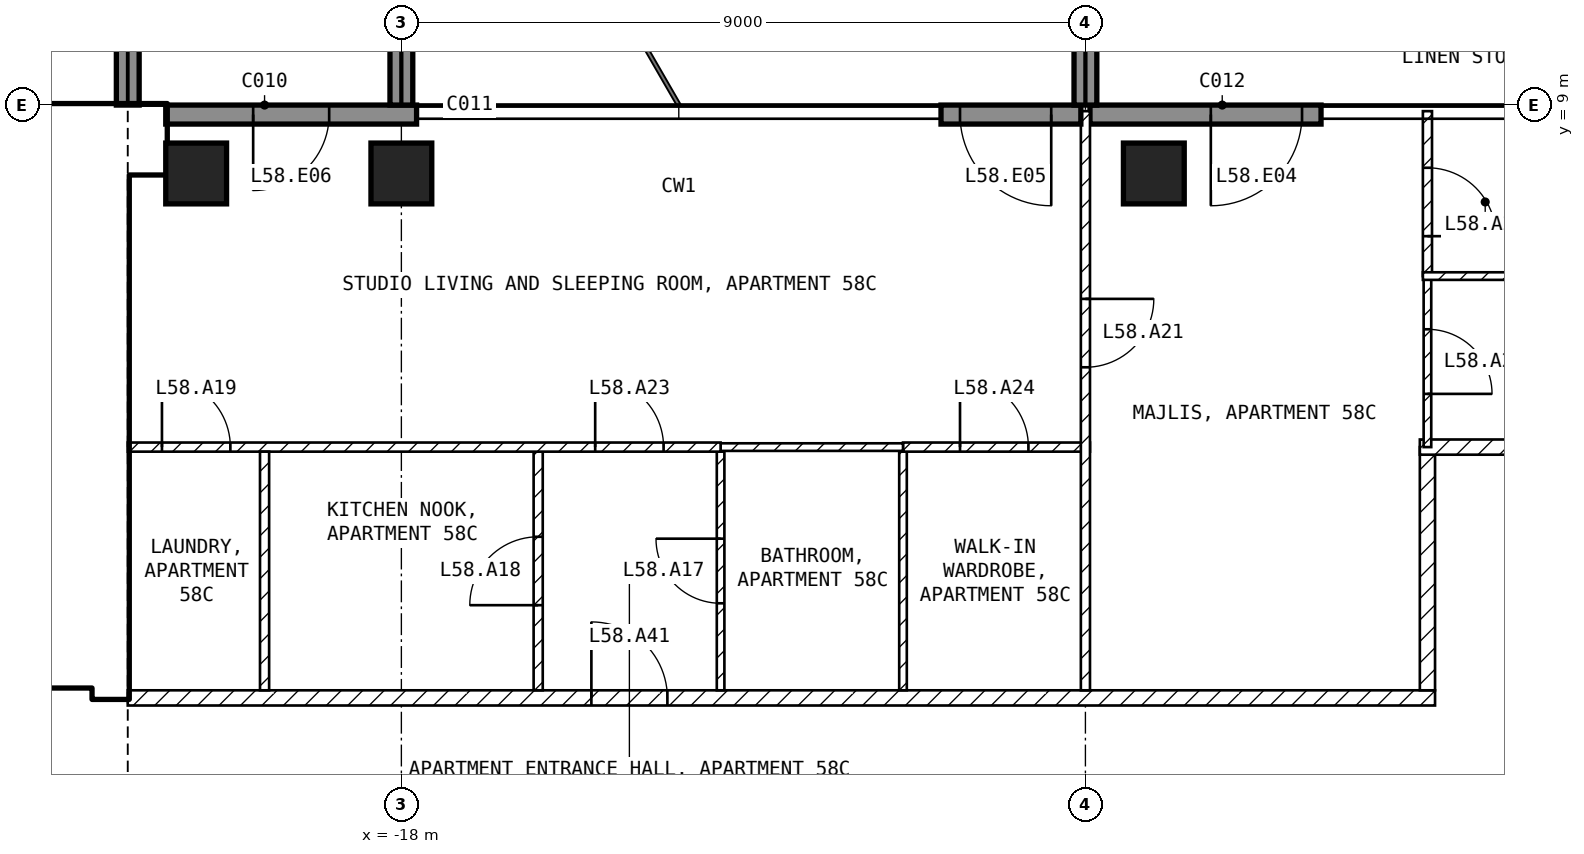
"""IFC4 building model, lengths in metres.
Left out: names, types, materials, properties, quantities, classifications, styles, units other than length and angle.
Written with IfcOpenShell. Run it as: python <this file> out.ifc"""

import sys

from ifc_helpers import new_model, si_unit, direction, frame, frame_2d, origin, origin_2d, place, context, subcontext, project, spatial, rectangle, extrude, element, fill, save


model = new_model("IFC4")
c1 = context("Model", 3, precision=1e-05, world=origin(), true_north=direction((0.0, 1.0)))
c2 = subcontext(c1, "Body", "Model", "MODEL_VIEW")
j1 = project(units=[si_unit("LENGTHUNIT", "METRE"), si_unit("PLANEANGLEUNIT", "RADIAN")], contexts=[c1])
p1 = place(None, origin())
s1 = spatial("IfcSite", under=j1, at=p1, CompositionType="ELEMENT")
p2 = place(p1, origin())
s2 = spatial("IfcBuilding", under=s1, at=p2, CompositionType="ELEMENT")
p3 = place(p2, frame((0.0, 0.0, 232.5)))
s3 = spatial("IfcBuildingStorey", under=s2, at=p3, CompositionType="ELEMENT", Elevation=232.5)
for number, where, z_axis, x_axis in (
    (1, (-20.7, 8.1, -0.25), (0.0, 0.0, 1.0), (1.0, 0.0, 0.0)),
    (2, (-18.0, 8.1, -0.25), (0.0, 0.0, 1.0), (1.0, 0.0, 0.0)),
    (3, (-8.1, 8.1, -0.25), (0.0, 0.0, 1.0), (1.0, 0.0, 0.0)),
):
    element("IfcColumn", number, at=place(p3, frame(where, z_axis=z_axis, x_axis=x_axis)), inside=s3, PredefinedType="COLUMN", context=c2, shape_type="SweptSolid", body=[
        extrude(rectangle(XDim=0.8, YDim=0.8, at=origin_2d()), origin(), (0.0, 0.0, 1.0), 3.5),
    ])
p4 = place(p3, frame((-5.9, 8.875, 0.0), z_axis=(0.0, 0.0, 1.0), x_axis=(-1.0, 0.0, 0.0)))
e4 = element("IfcWall", 4, at=p4, inside=s3, PredefinedType="SOLIDWALL", context=c2, shape_type="SweptSolid", body=[
    extrude(rectangle(XDim=3.04, YDim=0.25, at=frame_2d((1.52, 0.0))), origin(), (0.0, 0.0, 1.0), 3.25),
])
p5 = place(p4, frame((0.25, 0.0, 0.0)))
e5 = element("IfcOpeningElement", 5, at=p5, cuts=e4, PredefinedType="OPENING", context=c2, shape_type="SweptSolid", body=[
    extrude(rectangle(XDim=1.2, YDim=2.4, at=frame_2d((0.6, 1.2))), frame((0.0, 0.135, 0.0), z_axis=(0.0, -1.0, 0.0), x_axis=(1.0, 0.0, 0.0)), (0.0, 0.0, 1.0), 0.27),
])
p6 = place(p3, frame((-9.06, 8.875, 0.0), z_axis=(0.0, 0.0, 1.0), x_axis=(-1.0, 0.0, 0.0)))
e6 = element("IfcWall", 6, at=p6, inside=s3, PredefinedType="SOLIDWALL", context=c2, shape_type="SweptSolid", body=[
    extrude(rectangle(XDim=1.84, YDim=0.25, at=frame_2d((0.92, 0.0))), origin(), (0.0, 0.0, 1.0), 3.25),
])
p7 = place(p6, frame((0.39, 0.0, 0.0)))
e7 = element("IfcOpeningElement", 7, at=p7, cuts=e6, PredefinedType="OPENING", context=c2, shape_type="SweptSolid", body=[
    extrude(rectangle(XDim=1.2, YDim=2.4, at=frame_2d((0.6, 1.2))), frame((0.0, 0.135, 0.0), z_axis=(0.0, -1.0, 0.0), x_axis=(1.0, 0.0, 0.0)), (0.0, 0.0, 1.0), 0.27),
])
p8 = place(p3, frame((-17.8, 8.875, 0.0), z_axis=(0.0, 0.0, 1.0), x_axis=(-1.0, 0.0, 0.0)))
e8 = element("IfcWall", 8, at=p8, inside=s3, PredefinedType="SOLIDWALL", context=c2, shape_type="SweptSolid", body=[
    extrude(rectangle(XDim=3.3, YDim=0.25, at=frame_2d((1.65, 0.0))), origin(), (0.0, 0.0, 1.0), 3.25),
])
p9 = place(p8, frame((1.15, 0.0, 0.0)))
e9 = element("IfcOpeningElement", 9, at=p9, cuts=e8, PredefinedType="OPENING", context=c2, shape_type="SweptSolid", body=[
    extrude(rectangle(XDim=1.0, YDim=2.4, at=frame_2d((0.5, 1.2))), frame((0.0, 0.135, 0.0), z_axis=(0.0, -1.0, 0.0), x_axis=(1.0, 0.0, 0.0)), (0.0, 0.0, 1.0), 0.27),
])
for number, where, z_axis, x_axis in (
    (10, (-21.6, 9.0, 0.0), (0.0, 0.0, 1.0), (0.0, 1.0, 0.0)),
    (11, (-18.0, 9.0, 0.0), (0.0, 0.0, 1.0), (0.0, 1.0, 0.0)),
    (12, (-9.0, 9.0, 0.0), (0.0, 0.0, 1.0), (0.0, 1.0, 0.0)),
):
    element("IfcWall", number, at=place(p3, frame(where, z_axis=z_axis, x_axis=x_axis)), inside=s3, PredefinedType="SOLIDWALL", context=c2, shape_type="SweptSolid", body=[
        extrude(rectangle(XDim=2.7, YDim=0.3, at=frame_2d((1.35, 0.0))), origin(), (0.0, 0.0, 1.0), 3.25),
    ])
p10 = place(p3, frame((-29.75, 8.55, 0.0), z_axis=(0.0, 0.0, 1.0), x_axis=(1.0, 0.0, 0.0)))
e13 = element("IfcWall", 13, at=p10, inside=s3, PredefinedType="SHEAR", context=c2, shape_type="SweptSolid", body=[
    extrude(rectangle(XDim=8.65, YDim=0.9, at=frame_2d((4.325, 0.0))), origin(), (0.0, 0.0, 1.0), 3.25),
])
p11 = place(p3, frame((-21.825, 1.2, 0.0), z_axis=(0.0, 0.0, 1.0), x_axis=(0.0, 1.0, 0.0)))
e14 = element("IfcWall", 14, at=p11, inside=s3, PredefinedType="SHEAR", context=c2, shape_type="SweptSolid", body=[
    extrude(rectangle(XDim=6.9, YDim=0.45, at=frame_2d((3.45, 0.0))), origin(), (0.0, 0.0, 1.0), 3.25),
])
p12 = place(p3, frame((-33.35, 1.45, 0.0), z_axis=(0.0, 0.0, 1.0), x_axis=(1.0, 0.0, 0.0)))
e15 = element("IfcWall", 15, at=p12, inside=s3, PredefinedType="SOLIDWALL", context=c2, shape_type="SweptSolid", body=[
    extrude(rectangle(XDim=11.3, YDim=0.2, at=frame_2d((5.65, 0.0))), origin(), (0.0, 0.0, 1.0), 3.25),
])
p13 = place(p12, frame((9.55, 0.0, 0.0)))
e16 = element("IfcOpeningElement", 16, at=p13, cuts=e15, PredefinedType="OPENING", context=c2, shape_type="SweptSolid", body=[
    extrude(rectangle(XDim=1.0, YDim=2.1, at=frame_2d((0.5, 1.05))), frame((0.0, 0.11, 0.0), z_axis=(0.0, -1.0, 0.0), x_axis=(1.0, 0.0, 0.0)), (0.0, 0.0, 1.0), 0.22),
])
p14 = place(p12, frame((7.05, 0.0, 0.0)))
e17 = element("IfcOpeningElement", 17, at=p14, cuts=e15, PredefinedType="OPENING", context=c2, shape_type="SweptSolid", body=[
    extrude(rectangle(XDim=1.0, YDim=2.1, at=frame_2d((0.5, 1.05))), frame((0.0, 0.11, 0.0), z_axis=(0.0, -1.0, 0.0), x_axis=(1.0, 0.0, 0.0)), (0.0, 0.0, 1.0), 0.22),
])
p15 = place(p12, frame((1.175, 0.0, 0.0)))
e18 = element("IfcOpeningElement", 18, at=p15, cuts=e15, PredefinedType="OPENING", context=c2, shape_type="SweptSolid", body=[
    extrude(rectangle(XDim=0.9, YDim=2.1, at=frame_2d((0.45, 1.05))), frame((0.0, 0.11, 0.0), z_axis=(0.0, -1.0, 0.0), x_axis=(1.0, 0.0, 0.0)), (0.0, 0.0, 1.0), 0.22),
])
p16 = place(p3, frame((-28.35, 5.15, 0.0), z_axis=(0.0, 0.0, 1.0), x_axis=(1.0, 0.0, 0.0)))
e19 = element("IfcWall", 19, at=p16, inside=s3, PredefinedType="SOLIDWALL", context=c2, shape_type="SweptSolid", body=[
    extrude(rectangle(XDim=6.3, YDim=0.2, at=frame_2d((3.15, 0.0))), origin(), (0.0, 0.0, 1.0), 3.25),
])
p17 = place(p16, frame((5.1, 0.0, 0.0)))
e20 = element("IfcOpeningElement", 20, at=p17, cuts=e19, PredefinedType="OPENING", context=c2, shape_type="SweptSolid", body=[
    extrude(rectangle(XDim=1.0, YDim=2.1, at=frame_2d((0.5, 1.05))), frame((0.0, 0.11, 0.0), z_axis=(0.0, -1.0, 0.0), x_axis=(1.0, 0.0, 0.0)), (0.0, 0.0, 1.0), 0.22),
])
p18 = place(p3, frame((-21.6, 1.2, 0.0), z_axis=(0.0, 0.0, 1.0), x_axis=(1.0, 0.0, 0.0)))
e21 = element("IfcWall", 21, at=p18, inside=s3, PredefinedType="PARTITIONING", context=c2, shape_type="SweptSolid", body=[
    extrude(rectangle(XDim=17.2, YDim=0.2, at=frame_2d((8.6, 0.0))), origin(), (0.0, 0.0, 1.0), 3.25),
])
p19 = place(p18, frame((6.1, 0.0, 0.0)))
e22 = element("IfcOpeningElement", 22, at=p19, cuts=e21, PredefinedType="OPENING", context=c2, shape_type="SweptSolid", body=[
    extrude(rectangle(XDim=1.0, YDim=2.1, at=frame_2d((0.5, 1.05))), frame((0.0, 0.11, 0.0), z_axis=(0.0, -1.0, 0.0), x_axis=(1.0, 0.0, 0.0)), (0.0, 0.0, 1.0), 0.22),
])
p20 = place(p3, frame((-4.5, 1.3, 0.0), z_axis=(0.0, 0.0, 1.0), x_axis=(0.0, 1.0, 0.0)))
e23 = element("IfcWall", 23, at=p20, inside=s3, PredefinedType="PARTITIONING", context=c2, shape_type="SweptSolid", body=[
    extrude(rectangle(XDim=3.2, YDim=0.2, at=frame_2d((1.6, 0.0))), origin(), (0.0, 0.0, 1.0), 3.25),
])
p21 = place(p3, frame((-4.6, 4.5, 0.0), z_axis=(0.0, 0.0, 1.0), x_axis=(1.0, 0.0, 0.0)))
e24 = element("IfcWall", 24, at=p21, inside=s3, PredefinedType="PARTITIONING", context=c2, shape_type="SweptSolid", body=[
    extrude(rectangle(XDim=3.5, YDim=0.2, at=frame_2d((1.75, 0.0))), origin(), (0.0, 0.0, 1.0), 3.25),
])
p22 = place(p3, frame((-11.4, 1.3, 0.0), z_axis=(0.0, 0.0, 1.0), x_axis=(0.0, 1.0, 0.0)))
e25 = element("IfcWall", 25, at=p22, inside=s3, PredefinedType="PARTITIONING", context=c2, shape_type="SweptSolid", body=[
    extrude(rectangle(XDim=3.14, YDim=0.1, at=frame_2d((1.57, 0.0))), origin(), (0.0, 0.0, 1.0), 3.25),
])
p23 = place(p3, frame((-11.4, 4.5, 0.0), z_axis=(0.0, 0.0, 1.0), x_axis=(1.0, 0.0, 0.0)))
e26 = element("IfcWall", 26, at=p23, inside=s3, PredefinedType="PARTITIONING", context=c2, shape_type="SweptSolid", body=[
    extrude(rectangle(XDim=2.46, YDim=0.12, at=frame_2d((1.23, 0.0))), origin(), (0.0, 0.0, 1.0), 3.25),
])
p24 = place(p23, frame((0.75, 0.0, 0.0)))
e27 = element("IfcOpeningElement", 27, at=p24, cuts=e26, PredefinedType="OPENING", context=c2, shape_type="SweptSolid", body=[
    extrude(rectangle(XDim=0.9, YDim=2.1, at=frame_2d((0.45, 1.05))), frame((0.0, 0.07, 0.0), z_axis=(0.0, -1.0, 0.0), x_axis=(1.0, 0.0, 0.0)), (0.0, 0.0, 1.0), 0.14),
])
p25 = place(p3, frame((-9.0, 8.92, 0.0), z_axis=(0.0, 0.0, 1.0), x_axis=(0.0, -1.0, 0.0)))
e28 = element("IfcWall", 28, at=p25, inside=s3, PredefinedType="PARTITIONING", context=c2, shape_type="SweptSolid", body=[
    extrude(rectangle(XDim=7.62, YDim=0.12, at=frame_2d((3.81, 0.0))), origin(), (0.0, 0.0, 1.0), 3.25),
])
p26 = place(p25, frame((2.47, 0.0, 0.0)))
e29 = element("IfcOpeningElement", 29, at=p26, cuts=e28, PredefinedType="OPENING", context=c2, shape_type="SweptSolid", body=[
    extrude(rectangle(XDim=0.9, YDim=2.1, at=frame_2d((0.45, 1.05))), frame((0.0, 0.07, 0.0), z_axis=(0.0, -1.0, 0.0), x_axis=(1.0, 0.0, 0.0)), (0.0, 0.0, 1.0), 0.14),
])
p27 = place(p3, frame((-13.8, 1.3, 0.0), z_axis=(0.0, 0.0, 1.0), x_axis=(0.0, 1.0, 0.0)))
e30 = element("IfcWall", 30, at=p27, inside=s3, PredefinedType="PARTITIONING", context=c2, shape_type="SweptSolid", body=[
    extrude(rectangle(XDim=3.14, YDim=0.1, at=frame_2d((1.57, 0.0))), origin(), (0.0, 0.0, 1.0), 3.25),
])
p28 = place(p27, frame((1.145, 0.0, 0.0)))
e31 = element("IfcOpeningElement", 31, at=p28, cuts=e30, PredefinedType="OPENING", context=c2, shape_type="SweptSolid", body=[
    extrude(rectangle(XDim=0.85, YDim=2.1, at=frame_2d((0.425, 1.05))), frame((0.0, 0.06, 0.0), z_axis=(0.0, -1.0, 0.0), x_axis=(1.0, 0.0, 0.0)), (0.0, 0.0, 1.0), 0.12),
])
p29 = place(p3, frame((-13.8, 4.5, 0.0), z_axis=(0.0, 0.0, 1.0), x_axis=(1.0, 0.0, 0.0)))
e32 = element("IfcWall", 32, at=p29, inside=s3, PredefinedType="PARTITIONING", context=c2, shape_type="SweptSolid", body=[
    extrude(rectangle(XDim=2.4, YDim=0.1, at=frame_2d((1.2, 0.0))), origin(), (0.0, 0.0, 1.0), 3.25),
])
p30 = place(p3, frame((-16.2, 1.3, 0.0), z_axis=(0.0, 0.0, 1.0), x_axis=(0.0, 1.0, 0.0)))
e33 = element("IfcWall", 33, at=p30, inside=s3, PredefinedType="PARTITIONING", context=c2, shape_type="SweptSolid", body=[
    extrude(rectangle(XDim=3.14, YDim=0.12, at=frame_2d((1.57, 0.0))), origin(), (0.0, 0.0, 1.0), 3.25),
])
p31 = place(p30, frame((1.12, 0.0, 0.0)))
e34 = element("IfcOpeningElement", 34, at=p31, cuts=e33, PredefinedType="OPENING", context=c2, shape_type="SweptSolid", body=[
    extrude(rectangle(XDim=0.9, YDim=2.1, at=frame_2d((0.45, 1.05))), frame((0.0, 0.07, 0.0), z_axis=(0.0, -1.0, 0.0), x_axis=(1.0, 0.0, 0.0)), (0.0, 0.0, 1.0), 0.14),
])
p32 = place(p3, frame((-21.6, 4.5, 0.0), z_axis=(0.0, 0.0, 1.0), x_axis=(1.0, 0.0, 0.0)))
e35 = element("IfcWall", 35, at=p32, inside=s3, PredefinedType="PARTITIONING", context=c2, shape_type="SweptSolid", body=[
    extrude(rectangle(XDim=7.8, YDim=0.12, at=frame_2d((3.9, 0.0))), origin(), (0.0, 0.0, 1.0), 3.25),
])
p33 = place(p32, frame((0.45, 0.0, 0.0)))
e36 = element("IfcOpeningElement", 36, at=p33, cuts=e35, PredefinedType="OPENING", context=c2, shape_type="SweptSolid", body=[
    extrude(rectangle(XDim=0.9, YDim=2.1, at=frame_2d((0.45, 1.05))), frame((0.0, 0.07, 0.0), z_axis=(0.0, -1.0, 0.0), x_axis=(1.0, 0.0, 0.0)), (0.0, 0.0, 1.0), 0.14),
])
p34 = place(p32, frame((6.15, 0.0, 0.0)))
e37 = element("IfcOpeningElement", 37, at=p34, cuts=e35, PredefinedType="OPENING", context=c2, shape_type="SweptSolid", body=[
    extrude(rectangle(XDim=0.9, YDim=2.1, at=frame_2d((0.45, 1.05))), frame((0.0, 0.07, 0.0), z_axis=(0.0, -1.0, 0.0), x_axis=(1.0, 0.0, 0.0)), (0.0, 0.0, 1.0), 0.14),
])
p35 = place(p3, frame((-19.8, 1.3, 0.0), z_axis=(0.0, 0.0, 1.0), x_axis=(0.0, 1.0, 0.0)))
e38 = element("IfcWall", 38, at=p35, inside=s3, PredefinedType="PARTITIONING", context=c2, shape_type="SweptSolid", body=[
    extrude(rectangle(XDim=3.14, YDim=0.12, at=frame_2d((1.57, 0.0))), origin(), (0.0, 0.0, 1.0), 3.25),
])
p36 = place(p3, frame((-4.5, 6.75, 0.0), z_axis=(0.0, 0.0, 1.0), x_axis=(0.0, -1.0, 0.0)))
e39 = element("IfcWall", 39, at=p36, inside=s3, PredefinedType="PARTITIONING", context=c2, shape_type="SweptSolid", body=[
    extrude(rectangle(XDim=2.25, YDim=0.1, at=frame_2d((1.125, 0.0))), origin(), (0.0, 0.0, 1.0), 3.25),
])
p37 = place(p36, frame((0.7, 0.0, 0.0)))
e40 = element("IfcOpeningElement", 40, at=p37, cuts=e39, PredefinedType="OPENING", context=c2, shape_type="SweptSolid", body=[
    extrude(rectangle(XDim=0.85, YDim=2.1, at=frame_2d((0.425, 1.05))), frame((0.0, 0.06, 0.0), z_axis=(0.0, -1.0, 0.0), x_axis=(1.0, 0.0, 0.0)), (0.0, 0.0, 1.0), 0.12),
])
p38 = place(p3, frame((-4.5, 8.92, 0.0), z_axis=(0.0, 0.0, 1.0), x_axis=(0.0, -1.0, 0.0)))
e41 = element("IfcWall", 41, at=p38, inside=s3, PredefinedType="PARTITIONING", context=c2, shape_type="SweptSolid", body=[
    extrude(rectangle(XDim=2.17, YDim=0.12, at=frame_2d((1.085, 0.0))), origin(), (0.0, 0.0, 1.0), 3.25),
])
p39 = place(p38, frame((0.745, 0.0, 0.0)))
e42 = element("IfcOpeningElement", 42, at=p39, cuts=e41, PredefinedType="OPENING", context=c2, shape_type="SweptSolid", body=[
    extrude(rectangle(XDim=0.9, YDim=2.1, at=frame_2d((0.45, 1.05))), frame((0.0, 0.07, 0.0), z_axis=(0.0, -1.0, 0.0), x_axis=(1.0, 0.0, 0.0)), (0.0, 0.0, 1.0), 0.14),
])
p40 = place(p3, frame((-4.56, 6.75, 0.0), z_axis=(0.0, 0.0, 1.0), x_axis=(1.0, 0.0, 0.0)))
e43 = element("IfcWall", 43, at=p40, inside=s3, PredefinedType="PARTITIONING", context=c2, shape_type="SweptSolid", body=[
    extrude(rectangle(XDim=3.46, YDim=0.1, at=frame_2d((1.73, 0.0))), origin(), (0.0, 0.0, 1.0), 3.25),
])
p41 = place(p5, origin())
e44 = element("IfcDoor", 44, at=p41, inside=s3, OperationType="SINGLE_SWING_RIGHT", PredefinedType="DOOR", context=c2, shape_type="SweptSolid", body=[
    extrude(rectangle(XDim=1.2, YDim=2.4, at=frame_2d((0.6, 1.2))), frame((0.0, 0.025, 0.0), z_axis=(0.0, -1.0, 0.0), x_axis=(1.0, 0.0, 0.0)), (0.0, 0.0, 1.0), 0.05),
])
fill(e5, e44)
p42 = place(p7, origin())
e45 = element("IfcDoor", 45, at=p42, inside=s3, OperationType="SINGLE_SWING_LEFT", PredefinedType="DOOR", context=c2, shape_type="SweptSolid", body=[
    extrude(rectangle(XDim=1.2, YDim=2.4, at=frame_2d((0.6, 1.2))), frame((0.0, 0.025, 0.0), z_axis=(0.0, -1.0, 0.0), x_axis=(1.0, 0.0, 0.0)), (0.0, 0.0, 1.0), 0.05),
])
fill(e7, e45)
p43 = place(p9, origin())
e46 = element("IfcDoor", 46, at=p43, inside=s3, OperationType="SINGLE_SWING_RIGHT", PredefinedType="DOOR", context=c2, shape_type="SweptSolid", body=[
    extrude(rectangle(XDim=1.0, YDim=2.4, at=frame_2d((0.5, 1.2))), frame((0.0, 0.025, 0.0), z_axis=(0.0, -1.0, 0.0), x_axis=(1.0, 0.0, 0.0)), (0.0, 0.0, 1.0), 0.05),
])
fill(e9, e46)
p44 = place(p17, origin())
e47 = element("IfcDoor", 47, at=p44, inside=s3, OperationType="SINGLE_SWING_LEFT", PredefinedType="DOOR", context=c2, shape_type="SweptSolid", body=[
    extrude(rectangle(XDim=1.0, YDim=2.1, at=frame_2d((0.5, 1.05))), frame((0.0, 0.025, 0.0), z_axis=(0.0, -1.0, 0.0), x_axis=(1.0, 0.0, 0.0)), (0.0, 0.0, 1.0), 0.05),
])
fill(e20, e47)
p45 = place(p28, origin())
e48 = element("IfcDoor", 48, at=p45, inside=s3, OperationType="SINGLE_SWING_RIGHT", PredefinedType="DOOR", context=c2, shape_type="SweptSolid", body=[
    extrude(rectangle(XDim=0.85, YDim=2.1, at=frame_2d((0.425, 1.05))), frame((0.0, 0.025, 0.0), z_axis=(0.0, -1.0, 0.0), x_axis=(1.0, 0.0, 0.0)), (0.0, 0.0, 1.0), 0.05),
])
fill(e31, e48)
p46 = place(p31, origin())
e49 = element("IfcDoor", 49, at=p46, inside=s3, OperationType="SINGLE_SWING_LEFT", PredefinedType="DOOR", context=c2, shape_type="SweptSolid", body=[
    extrude(rectangle(XDim=0.9, YDim=2.1, at=frame_2d((0.45, 1.05))), frame((0.0, 0.025, 0.0), z_axis=(0.0, -1.0, 0.0), x_axis=(1.0, 0.0, 0.0)), (0.0, 0.0, 1.0), 0.05),
])
fill(e34, e49)
p47 = place(p33, origin())
e50 = element("IfcDoor", 50, at=p47, inside=s3, OperationType="SINGLE_SWING_LEFT", PredefinedType="DOOR", context=c2, shape_type="SweptSolid", body=[
    extrude(rectangle(XDim=0.9, YDim=2.1, at=frame_2d((0.45, 1.05))), frame((0.0, 0.025, 0.0), z_axis=(0.0, -1.0, 0.0), x_axis=(1.0, 0.0, 0.0)), (0.0, 0.0, 1.0), 0.05),
])
fill(e36, e50)
p48 = place(p39, origin())
e51 = element("IfcDoor", 51, at=p48, inside=s3, OperationType="SINGLE_SWING_RIGHT", PredefinedType="DOOR", context=c2, shape_type="SweptSolid", body=[
    extrude(rectangle(XDim=0.9, YDim=2.1, at=frame_2d((0.45, 1.05))), frame((0.0, 0.025, 0.0), z_axis=(0.0, -1.0, 0.0), x_axis=(1.0, 0.0, 0.0)), (0.0, 0.0, 1.0), 0.05),
])
fill(e42, e51)
p49 = place(p26, origin())
e52 = element("IfcDoor", 52, at=p49, inside=s3, OperationType="SINGLE_SWING_LEFT", PredefinedType="DOOR", context=c2, shape_type="SweptSolid", body=[
    extrude(rectangle(XDim=0.9, YDim=2.1, at=frame_2d((0.45, 1.05))), frame((0.0, 0.025, 0.0), z_axis=(0.0, -1.0, 0.0), x_axis=(1.0, 0.0, 0.0)), (0.0, 0.0, 1.0), 0.05),
])
fill(e29, e52)
p50 = place(p37, origin())
e53 = element("IfcDoor", 53, at=p50, inside=s3, OperationType="SINGLE_SWING_RIGHT", PredefinedType="DOOR", context=c2, shape_type="SweptSolid", body=[
    extrude(rectangle(XDim=0.85, YDim=2.1, at=frame_2d((0.425, 1.05))), frame((0.0, 0.025, 0.0), z_axis=(0.0, -1.0, 0.0), x_axis=(1.0, 0.0, 0.0)), (0.0, 0.0, 1.0), 0.05),
])
fill(e40, e53)
p51 = place(p34, origin())
e54 = element("IfcDoor", 54, at=p51, inside=s3, OperationType="SINGLE_SWING_LEFT", PredefinedType="DOOR", context=c2, shape_type="SweptSolid", body=[
    extrude(rectangle(XDim=0.9, YDim=2.1, at=frame_2d((0.45, 1.05))), frame((0.0, 0.025, 0.0), z_axis=(0.0, -1.0, 0.0), x_axis=(1.0, 0.0, 0.0)), (0.0, 0.0, 1.0), 0.05),
])
fill(e37, e54)
p52 = place(p24, origin())
e55 = element("IfcDoor", 55, at=p52, inside=s3, OperationType="SINGLE_SWING_LEFT", PredefinedType="DOOR", context=c2, shape_type="SweptSolid", body=[
    extrude(rectangle(XDim=0.9, YDim=2.1, at=frame_2d((0.45, 1.05))), frame((0.0, 0.025, 0.0), z_axis=(0.0, -1.0, 0.0), x_axis=(1.0, 0.0, 0.0)), (0.0, 0.0, 1.0), 0.05),
])
fill(e27, e55)
p53 = place(p19, origin())
e56 = element("IfcDoor", 56, at=p53, inside=s3, OperationType="SINGLE_SWING_LEFT", PredefinedType="DOOR", context=c2, shape_type="SweptSolid", body=[
    extrude(rectangle(XDim=1.0, YDim=2.1, at=frame_2d((0.5, 1.05))), frame((0.0, 0.025, 0.0), z_axis=(0.0, -1.0, 0.0), x_axis=(1.0, 0.0, 0.0)), (0.0, 0.0, 1.0), 0.05),
])
fill(e22, e56)
save(model, sys.argv[1])
